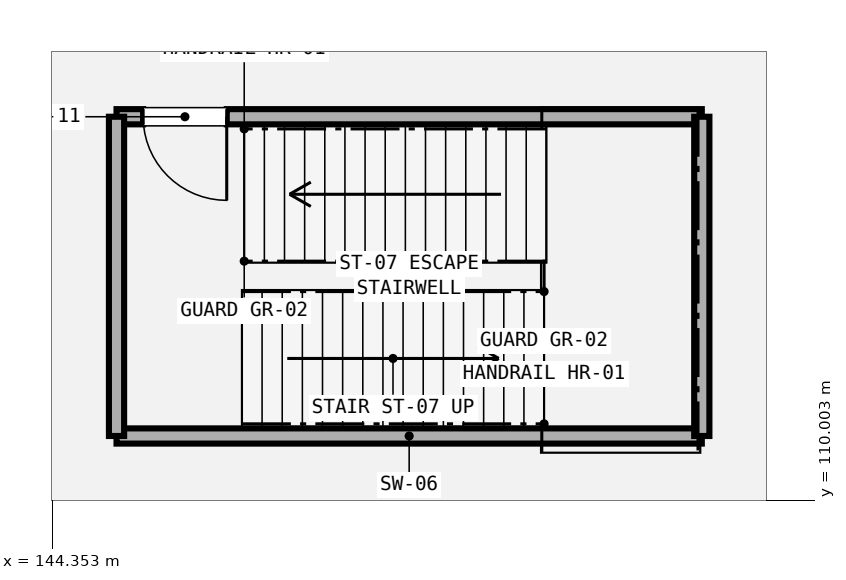
"""IFC4 building model, lengths in metres.
Left out: names, types, materials, properties, quantities, classifications, styles, units other than length and angle.
Written with IfcOpenShell. Run it as: python <this file> out.ifc"""

import sys

from ifc_helpers import new_model, si_unit, direction, frame, frame_2d, origin, place, context, subcontext, project, spatial, rectangle, extrude, element, fill, save


model = new_model("IFC4")
c1 = context("Model", 3, precision=1e-05, world=origin(), true_north=direction((0.0, 1.0)))
c2 = subcontext(c1, "Body", "Model", "MODEL_VIEW")
j1 = project(units=[si_unit("LENGTHUNIT", "METRE"), si_unit("PLANEANGLEUNIT", "RADIAN")], contexts=[c1])
p1 = place(None, origin())
s1 = spatial("IfcSite", under=j1, at=p1, CompositionType="ELEMENT")
p2 = place(p1, origin())
s2 = spatial("IfcBuilding", under=s1, at=p2, CompositionType="ELEMENT")
p3 = place(p2, frame((0.0, 0.0, -5.4)))
s3 = spatial("IfcBuildingStorey", under=s2, at=p3, CompositionType="ELEMENT", Elevation=-5.4)
p4 = place(p3, frame((145.2, 110.85, -0.15), z_axis=(0.0, 0.0, 1.0), x_axis=(1.0, 0.0, 0.0)))
e1 = element("IfcWall", 1, at=p4, inside=s3, PredefinedType="SHEAR", context=c2, shape_type="SweptSolid", body=[
    extrude(rectangle(XDim=7.7, YDim=0.2, at=frame_2d((3.85, 0.0))), origin(), (0.0, 0.0, 1.0), 5.13),
])
p5 = place(p3, frame((145.2, 115.05, -0.15), z_axis=(0.0, 0.0, 1.0), x_axis=(1.0, 0.0, 0.0)))
e2 = element("IfcWall", 2, at=p5, inside=s3, PredefinedType="SHEAR", context=c2, shape_type="SweptSolid", body=[
    extrude(rectangle(XDim=7.7, YDim=0.2, at=frame_2d((3.85, 0.0))), origin(), (0.0, 0.0, 1.0), 5.13),
])
p6 = place(p5, frame((0.35, 0.0, 0.15)))
e3 = element("IfcOpeningElement", 3, at=p6, cuts=e2, PredefinedType="OPENING", context=c2, shape_type="SweptSolid", body=[
    extrude(rectangle(XDim=1.1, YDim=2.2, at=frame_2d((0.55, 1.1))), frame((0.0, 0.11, 0.0), z_axis=(0.0, -1.0, 0.0), x_axis=(1.0, 0.0, 0.0)), (0.0, 0.0, 1.0), 0.22),
])
for number, where, z_axis, x_axis in (
    (4, (145.2, 110.85, -0.15), (0.0, 0.0, 1.0), (0.0, 1.0, 0.0)),
    (5, (152.9, 110.85, -0.15), (0.0, 0.0, 1.0), (0.0, 1.0, 0.0)),
):
    element("IfcWall", number, at=place(p3, frame(where, z_axis=z_axis, x_axis=x_axis)), inside=s3, PredefinedType="SHEAR", context=c2, shape_type="SweptSolid", body=[
        extrude(rectangle(XDim=4.2, YDim=0.2, at=frame_2d((2.1, 0.0))), origin(), (0.0, 0.0, 1.0), 5.13),
    ])
p7 = place(p6, frame((1.1, 0.0, 0.0), z_axis=(0.0, 0.0, 1.0), x_axis=(-1.0, 0.0, 0.0)))
e6 = element("IfcDoor", 6, at=p7, inside=s3, OperationType="SINGLE_SWING_LEFT", PredefinedType="DOOR", context=c2, shape_type="SweptSolid", body=[
    extrude(rectangle(XDim=1.1, YDim=2.2, at=frame_2d((0.55, 1.1))), frame((0.0, 0.025, 0.0), z_axis=(0.0, -1.0, 0.0), x_axis=(1.0, 0.0, 0.0)), (0.0, 0.0, 1.0), 0.05),
])
fill(e3, e6)
save(model, sys.argv[1])
